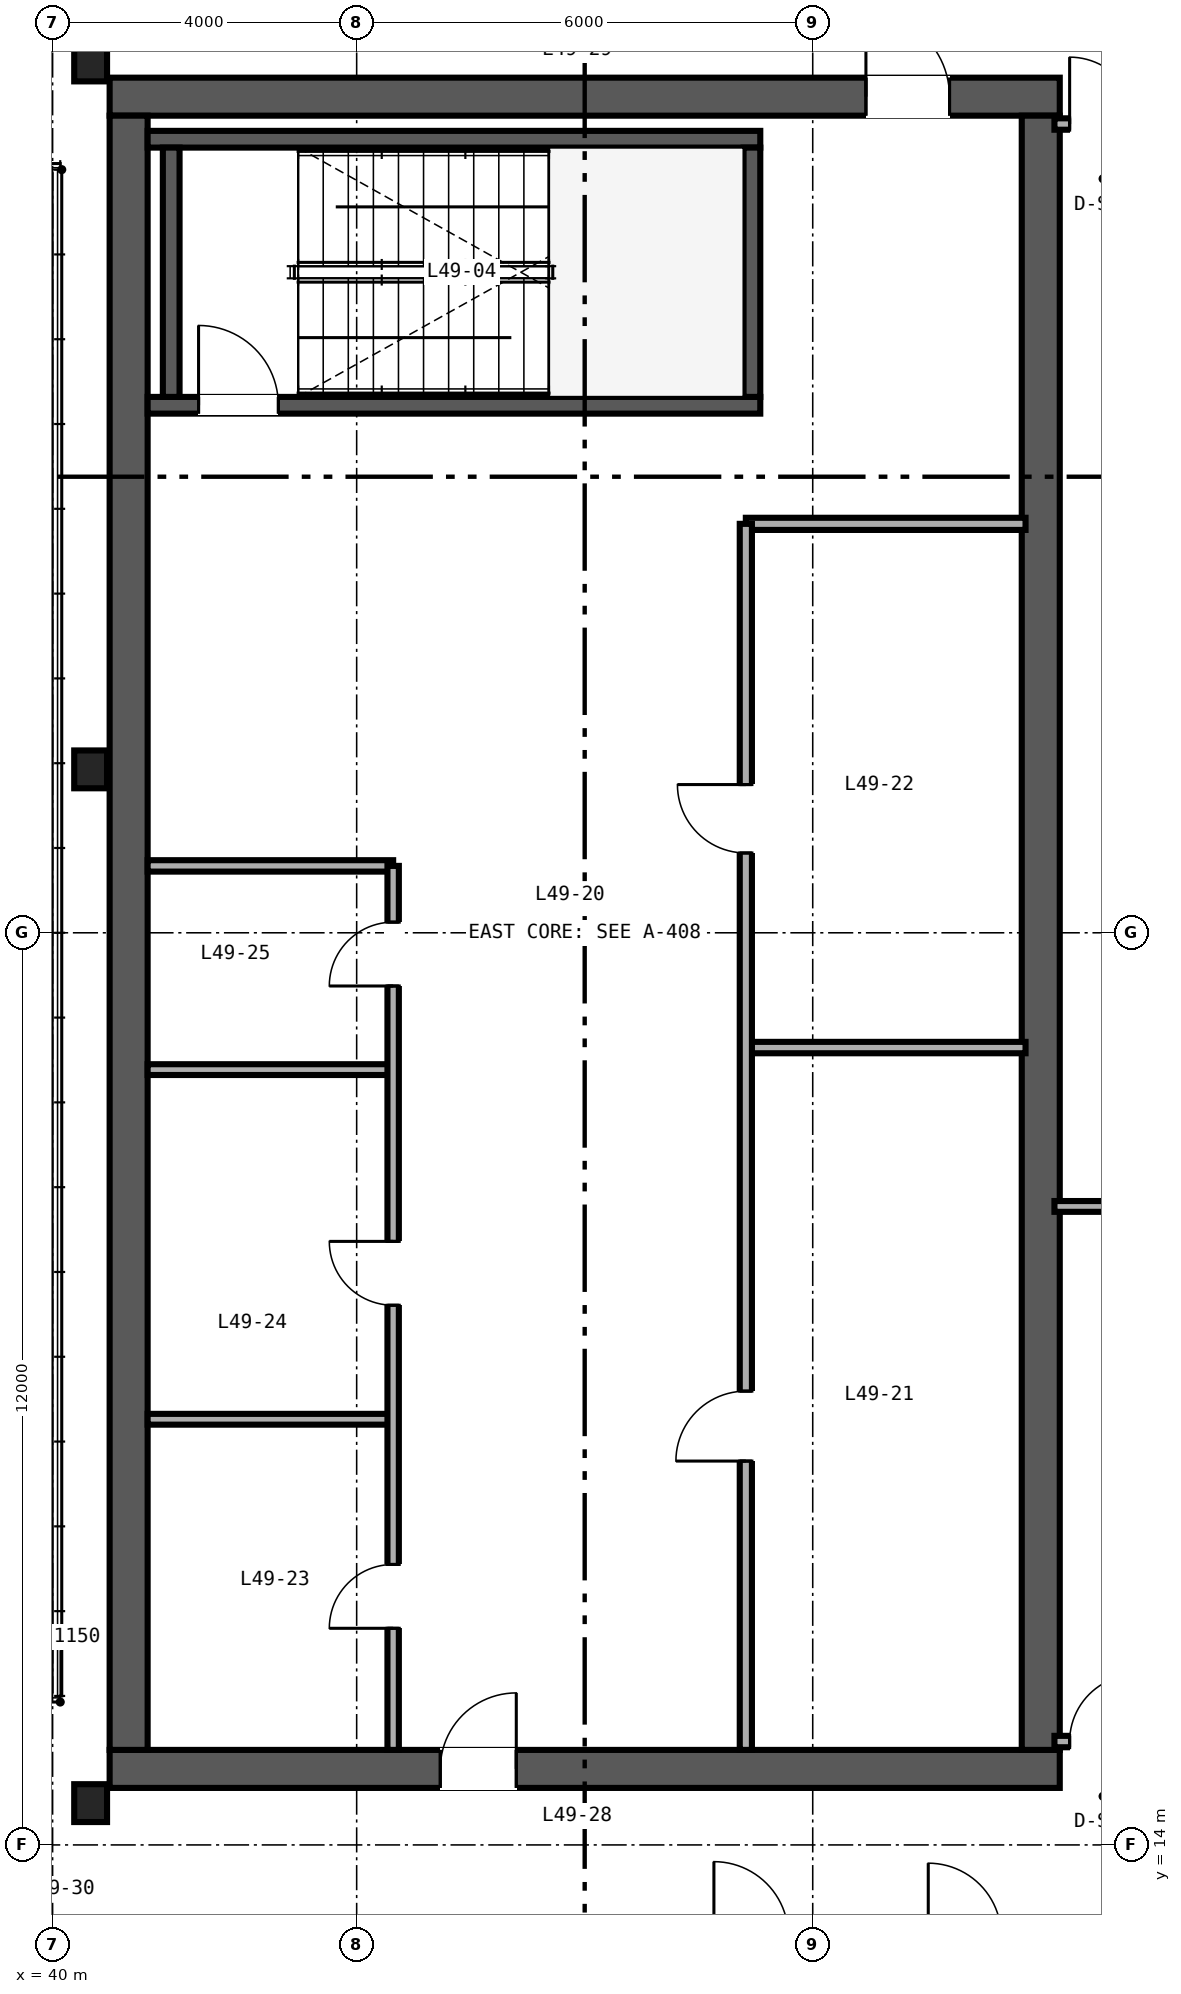
"""IFC4 building model, lengths in metres.
Left out: names, types, materials, properties, quantities, classifications, styles, units other than length and angle.
Written with IfcOpenShell. Run it as: python <this file> out.ifc"""

import sys

from ifc_helpers import new_model, si_unit, direction, frame, frame_2d, origin, origin_2d, place, context, subcontext, project, spatial, rectangle, i_section, extrude, source, transform, mapped, element, fill, save


model = new_model("IFC4")
c1 = context("Model", 3, precision=1e-05, world=origin(), true_north=direction((0.0, 1.0)))
c2 = subcontext(c1, "Body", "Model", "MODEL_VIEW")
j1 = project(units=[si_unit("LENGTHUNIT", "METRE"), si_unit("PLANEANGLEUNIT", "RADIAN")], contexts=[c1])
p1 = place(None, origin())
s1 = spatial("IfcSite", under=j1, at=p1, CompositionType="ELEMENT")
p2 = place(p1, origin())
s2 = spatial("IfcBuilding", under=s1, at=p2, CompositionType="ELEMENT")
p3 = place(p2, frame((0.0, 0.0, 195.6)))
s3 = spatial("IfcBuildingStorey", under=s2, at=p3, CompositionType="ELEMENT", Elevation=195.6)
p4 = place(p3, frame((40.75, 15.0, 0.0), z_axis=(0.0, 0.0, 1.0), x_axis=(1.0, 0.0, 0.0)))
e1 = element("IfcWall", 1, at=p4, inside=s3, PredefinedType="SHEAR", context=c2, shape_type="SweptSolid", body=[
    extrude(rectangle(XDim=12.5, YDim=0.5, at=frame_2d((6.25, 0.0))), origin(), (0.0, 0.0, 1.0), 3.37),
])
p5 = place(p4, frame((4.35, 0.0, 0.0)))
e2 = element("IfcOpeningElement", 2, at=p5, cuts=e1, PredefinedType="OPENING", context=c2, shape_type="SweptSolid", body=[
    extrude(rectangle(XDim=1.0, YDim=2.15, at=frame_2d((0.5, 1.075))), frame((0.0, 0.26, 0.0), z_axis=(0.0, -1.0, 0.0), x_axis=(1.0, 0.0, 0.0)), (0.0, 0.0, 1.0), 0.52),
])
p6 = place(p3, frame((40.75, 37.0, 0.0), z_axis=(0.0, 0.0, 1.0), x_axis=(1.0, 0.0, 0.0)))
e3 = element("IfcWall", 3, at=p6, inside=s3, PredefinedType="SHEAR", context=c2, shape_type="SweptSolid", body=[
    extrude(rectangle(XDim=12.5, YDim=0.5, at=frame_2d((6.25, 0.0))), origin(), (0.0, 0.0, 1.0), 3.37),
])
p7 = place(p6, frame((9.95, 0.0, 0.0)))
e4 = element("IfcOpeningElement", 4, at=p7, cuts=e3, PredefinedType="OPENING", context=c2, shape_type="SweptSolid", body=[
    extrude(rectangle(XDim=1.1, YDim=2.15, at=frame_2d((0.55, 1.075))), frame((0.0, 0.26, 0.0), z_axis=(0.0, -1.0, 0.0), x_axis=(1.0, 0.0, 0.0)), (0.0, 0.0, 1.0), 0.52),
])
for number, where, z_axis, x_axis in (
    (5, (41.0, 15.25, 0.0), (0.0, 0.0, 1.0), (0.0, 1.0, 0.0)),
    (6, (53.0, 15.25, 0.0), (0.0, 0.0, 1.0), (0.0, 1.0, 0.0)),
):
    element("IfcWall", number, at=place(p3, frame(where, z_axis=z_axis, x_axis=x_axis)), inside=s3, PredefinedType="SHEAR", context=c2, shape_type="SweptSolid", body=[
        extrude(rectangle(XDim=21.5, YDim=0.5, at=frame_2d((10.75, 0.0))), origin(), (0.0, 0.0, 1.0), 3.37),
    ])
p8 = place(p3, frame((41.25, 32.94, 0.0), z_axis=(0.0, 0.0, 1.0), x_axis=(1.0, 0.0, 0.0)))
e7 = element("IfcWall", 7, at=p8, inside=s3, PredefinedType="SHEAR", context=c2, shape_type="SweptSolid", body=[
    extrude(rectangle(XDim=8.06, YDim=0.22, at=frame_2d((4.03, 0.0))), origin(), (0.0, 0.0, 1.0), 3.4),
])
p9 = place(p8, frame((0.67, 0.0, 0.0)))
e8 = element("IfcOpeningElement", 8, at=p9, cuts=e7, PredefinedType="OPENING", context=c2, shape_type="SweptSolid", body=[
    extrude(rectangle(XDim=1.05, YDim=2.15, at=frame_2d((0.525, 1.075))), frame((0.0, 0.12, 0.0), z_axis=(0.0, -1.0, 0.0), x_axis=(1.0, 0.0, 0.0)), (0.0, 0.0, 1.0), 0.24),
])
p10 = place(p3, frame((41.25, 36.44, 0.0), z_axis=(0.0, 0.0, 1.0), x_axis=(1.0, 0.0, 0.0)))
e9 = element("IfcWall", 9, at=p10, inside=s3, PredefinedType="SHEAR", context=c2, shape_type="SweptSolid", body=[
    extrude(rectangle(XDim=8.06, YDim=0.22, at=frame_2d((4.03, 0.0))), origin(), (0.0, 0.0, 1.0), 3.4),
])
for number, where, z_axis, x_axis in (
    (10, (41.56, 33.05, 0.0), (0.0, 0.0, 1.0), (0.0, 1.0, 0.0)),
    (11, (49.2, 33.05, 0.0), (0.0, 0.0, 1.0), (0.0, 1.0, 0.0)),
):
    element("IfcWall", number, at=place(p3, frame(where, z_axis=z_axis, x_axis=x_axis)), inside=s3, PredefinedType="SHEAR", context=c2, shape_type="SweptSolid", body=[
        extrude(rectangle(XDim=3.28, YDim=0.22, at=frame_2d((1.64, 0.0))), origin(), (0.0, 0.0, 1.0), 3.4),
    ])
m1 = source(origin(), c2, "Body", "SweptSolid", [
    extrude(i_section(OverallWidth=0.432, OverallDepth=0.498, WebThickness=0.056, FlangeThickness=0.089, FilletRadius=0.025, at=origin_2d()), origin(), (0.0, 0.0, 1.0), 3.37),
])
for number, where, z_axis, x_axis in (
    (12, (40.5, 14.55, 0.0), (0.0, 0.0, 1.0), (1.0, 0.0, 0.0)),
    (13, (40.5, 28.15, 0.0), (0.0, 0.0, 1.0), (1.0, 0.0, 0.0)),
    (14, (40.5, 37.45, 0.0), (0.0, 0.0, 1.0), (1.0, 0.0, 0.0)),
):
    element("IfcColumn", number, at=place(p3, frame(where, z_axis=z_axis, x_axis=x_axis)), inside=s3, PredefinedType="COLUMN", context=c2, shape_type="MappedRepresentation", body=[
        mapped(m1, transform((0.0, 0.0, 0.0), scale=1.0)),
    ])
p11 = place(p3, frame((49.12, 31.38, 0.0), z_axis=(0.0, 0.0, 1.0), x_axis=(1.0, 0.0, 0.0)))
e15 = element("IfcWall", 15, at=p11, inside=s3, PredefinedType="PARTITIONING", context=c2, shape_type="SweptSolid", body=[
    extrude(rectangle(XDim=3.68, YDim=0.16, at=frame_2d((1.84, 0.0))), origin(), (0.0, 0.0, 1.0), 2.47),
])
p12 = place(p3, frame((49.12, 24.49, 0.0), z_axis=(0.0, 0.0, 1.0), x_axis=(1.0, 0.0, 0.0)))
e16 = element("IfcWall", 16, at=p12, inside=s3, PredefinedType="PARTITIONING", context=c2, shape_type="SweptSolid", body=[
    extrude(rectangle(XDim=3.68, YDim=0.15, at=frame_2d((1.84, 0.0))), origin(), (0.0, 0.0, 1.0), 3.37),
])
p13 = place(p3, frame((49.12, 15.25, 0.0), z_axis=(0.0, 0.0, 1.0), x_axis=(0.0, 1.0, 0.0)))
e17 = element("IfcWall", 17, at=p13, inside=s3, PredefinedType="PARTITIONING", context=c2, shape_type="SweptSolid", body=[
    extrude(rectangle(XDim=16.13, YDim=0.16, at=frame_2d((8.065, 0.0))), origin(), (0.0, 0.0, 1.0), 2.443),
])
p14 = place(p13, frame((3.8, 0.0, 0.0)))
e18 = element("IfcOpeningElement", 18, at=p14, cuts=e17, PredefinedType="OPENING", context=c2, shape_type="SweptSolid", body=[
    extrude(rectangle(XDim=0.92, YDim=2.15, at=frame_2d((0.46, 1.075))), frame((0.0, 0.09, 0.0), z_axis=(0.0, -1.0, 0.0), x_axis=(1.0, 0.0, 0.0)), (0.0, 0.0, 1.0), 0.18),
])
p15 = place(p13, frame((11.8, 0.0, 0.0)))
e19 = element("IfcOpeningElement", 19, at=p15, cuts=e17, PredefinedType="OPENING", context=c2, shape_type="SweptSolid", body=[
    extrude(rectangle(XDim=0.9, YDim=2.15, at=frame_2d((0.45, 1.075))), frame((0.0, 0.09, 0.0), z_axis=(0.0, -1.0, 0.0), x_axis=(1.0, 0.0, 0.0)), (0.0, 0.0, 1.0), 0.18),
])
p16 = place(p3, frame((41.25, 26.88, 0.0), z_axis=(0.0, 0.0, 1.0), x_axis=(1.0, 0.0, 0.0)))
e20 = element("IfcWall", 20, at=p16, inside=s3, PredefinedType="PARTITIONING", context=c2, shape_type="SweptSolid", body=[
    extrude(rectangle(XDim=3.23, YDim=0.15, at=frame_2d((1.615, 0.0))), origin(), (0.0, 0.0, 1.0), 3.37),
])
for number, where, z_axis, x_axis in (
    (21, (41.25, 19.6, 0.0), (0.0, 0.0, 1.0), (1.0, 0.0, 0.0)),
    (22, (41.25, 24.2, 0.0), (0.0, 0.0, 1.0), (1.0, 0.0, 0.0)),
):
    element("IfcWall", number, at=place(p3, frame(where, z_axis=z_axis, x_axis=x_axis)), inside=s3, PredefinedType="PARTITIONING", context=c2, shape_type="SweptSolid", body=[
        extrude(rectangle(XDim=3.23, YDim=0.142, at=frame_2d((1.615, 0.0))), origin(), (0.0, 0.0, 1.0), 3.37),
    ])
p17 = place(p3, frame((44.48, 15.25, 0.0), z_axis=(0.0, 0.0, 1.0), x_axis=(0.0, 1.0, 0.0)))
e23 = element("IfcWall", 23, at=p17, inside=s3, PredefinedType="PARTITIONING", context=c2, shape_type="SweptSolid", body=[
    extrude(rectangle(XDim=11.63, YDim=0.15, at=frame_2d((5.815, 0.0))), origin(), (0.0, 0.0, 1.0), 3.37),
])
p18 = place(p17, frame((1.6, 0.0, 0.0)))
e24 = element("IfcOpeningElement", 24, at=p18, cuts=e23, PredefinedType="OPENING", context=c2, shape_type="SweptSolid", body=[
    extrude(rectangle(XDim=0.84, YDim=2.1, at=frame_2d((0.42, 1.05))), frame((0.0, 0.085, 0.0), z_axis=(0.0, -1.0, 0.0), x_axis=(1.0, 0.0, 0.0)), (0.0, 0.0, 1.0), 0.17),
])
p19 = place(p17, frame((5.85, 0.0, 0.0)))
e25 = element("IfcOpeningElement", 25, at=p19, cuts=e23, PredefinedType="OPENING", context=c2, shape_type="SweptSolid", body=[
    extrude(rectangle(XDim=0.84, YDim=2.1, at=frame_2d((0.42, 1.05))), frame((0.0, 0.085, 0.0), z_axis=(0.0, -1.0, 0.0), x_axis=(1.0, 0.0, 0.0)), (0.0, 0.0, 1.0), 0.17),
])
p20 = place(p17, frame((10.05, 0.0, 0.0)))
e26 = element("IfcOpeningElement", 26, at=p20, cuts=e23, PredefinedType="OPENING", context=c2, shape_type="SweptSolid", body=[
    extrude(rectangle(XDim=0.84, YDim=2.1, at=frame_2d((0.42, 1.05))), frame((0.0, 0.085, 0.0), z_axis=(0.0, -1.0, 0.0), x_axis=(1.0, 0.0, 0.0)), (0.0, 0.0, 1.0), 0.17),
])
p21 = place(p3, frame((53.18, 15.36, 0.0), z_axis=(0.0, 0.0, 1.0), x_axis=(1.0, 0.0, 0.0)))
e27 = element("IfcWall", 27, at=p21, inside=s3, PredefinedType="PARTITIONING", context=c2, shape_type="SweptSolid", body=[
    extrude(rectangle(XDim=2.66, YDim=0.15, at=frame_2d((1.33, 0.0))), origin(), (0.0, 0.0, 1.0), 2.591),
])
p22 = place(p21, frame((0.2, 0.0, 0.0)))
e28 = element("IfcOpeningElement", 28, at=p22, cuts=e27, PredefinedType="OPENING", context=c2, shape_type="SweptSolid", body=[
    extrude(rectangle(XDim=0.88, YDim=2.15, at=frame_2d((0.44, 1.075))), frame((0.0, 0.085, 0.0), z_axis=(0.0, -1.0, 0.0), x_axis=(1.0, 0.0, 0.0)), (0.0, 0.0, 1.0), 0.17),
])
p23 = place(p3, frame((53.18, 36.64, 0.0), z_axis=(0.0, 0.0, 1.0), x_axis=(1.0, 0.0, 0.0)))
e29 = element("IfcWall", 29, at=p23, inside=s3, PredefinedType="PARTITIONING", context=c2, shape_type="SweptSolid", body=[
    extrude(rectangle(XDim=2.66, YDim=0.15, at=frame_2d((1.33, 0.0))), origin(), (0.0, 0.0, 1.0), 2.753),
])
p24 = place(p23, frame((0.2, 0.0, 0.0)))
e30 = element("IfcOpeningElement", 30, at=p24, cuts=e29, PredefinedType="OPENING", context=c2, shape_type="SweptSolid", body=[
    extrude(rectangle(XDim=0.88, YDim=2.15, at=frame_2d((0.44, 1.075))), frame((0.0, 0.085, 0.0), z_axis=(0.0, -1.0, 0.0), x_axis=(1.0, 0.0, 0.0)), (0.0, 0.0, 1.0), 0.17),
])
p25 = place(p3, frame((53.18, 22.4, 0.0), z_axis=(0.0, 0.0, 1.0), x_axis=(1.0, 0.0, 0.0)))
e31 = element("IfcWall", 31, at=p25, inside=s3, PredefinedType="PARTITIONING", context=c2, shape_type="SweptSolid", body=[
    extrude(rectangle(XDim=2.66, YDim=0.142, at=frame_2d((1.33, 0.0))), origin(), (0.0, 0.0, 1.0), 2.591),
])
m2 = source(origin(), c2, "Body", "SweptSolid", [
    extrude(rectangle(XDim=1.05, YDim=2.15, at=frame_2d((0.525, 1.075))), frame((0.0, 0.025, 0.0), z_axis=(0.0, -1.0, 0.0), x_axis=(1.0, 0.0, 0.0)), (0.0, 0.0, 1.0), 0.05),
])
p26 = place(p9, origin())
e32 = element("IfcDoor", 32, at=p26, inside=s3, OperationType="SINGLE_SWING_LEFT", PredefinedType="DOOR", context=c2, shape_type="MappedRepresentation", body=[
    mapped(m2, transform((0.0, 0.0, 0.0), scale=1.0)),
])
fill(e8, e32)
m3 = source(origin(), c2, "Body", "SweptSolid", [
    extrude(rectangle(XDim=1.0, YDim=2.15, at=frame_2d((0.5, 1.075))), frame((0.0, 0.025, 0.0), z_axis=(0.0, -1.0, 0.0), x_axis=(1.0, 0.0, 0.0)), (0.0, 0.0, 1.0), 0.05),
])
p27 = place(p5, origin())
e33 = element("IfcDoor", 33, at=p27, inside=s3, OperationType="SINGLE_SWING_RIGHT", PredefinedType="DOOR", context=c2, shape_type="MappedRepresentation", body=[
    mapped(m3, transform((0.0, 0.0, 0.0), scale=1.0)),
])
fill(e2, e33)
m4 = source(origin(), c2, "Body", "SweptSolid", [
    extrude(rectangle(XDim=1.1, YDim=2.15, at=frame_2d((0.55, 1.075))), frame((0.0, 0.025, 0.0), z_axis=(0.0, -1.0, 0.0), x_axis=(1.0, 0.0, 0.0)), (0.0, 0.0, 1.0), 0.05),
])
p28 = place(p7, origin())
e34 = element("IfcDoor", 34, at=p28, inside=s3, OperationType="SINGLE_SWING_LEFT", PredefinedType="DOOR", context=c2, shape_type="MappedRepresentation", body=[
    mapped(m4, transform((0.0, 0.0, 0.0), scale=1.0)),
])
fill(e4, e34)
m5 = source(origin(), c2, "Body", "SweptSolid", [
    extrude(rectangle(XDim=0.92, YDim=2.15, at=frame_2d((0.46, 1.075))), frame((0.0, 0.025, 0.0), z_axis=(0.0, -1.0, 0.0), x_axis=(1.0, 0.0, 0.0)), (0.0, 0.0, 1.0), 0.05),
])
p29 = place(p14, origin())
e35 = element("IfcDoor", 35, at=p29, inside=s3, OperationType="SINGLE_SWING_LEFT", PredefinedType="DOOR", context=c2, shape_type="MappedRepresentation", body=[
    mapped(m5, transform((0.0, 0.0, 0.0), scale=1.0)),
])
fill(e18, e35)
m6 = source(origin(), c2, "Body", "SweptSolid", [
    extrude(rectangle(XDim=0.9, YDim=2.15, at=frame_2d((0.45, 1.075))), frame((0.0, 0.025, 0.0), z_axis=(0.0, -1.0, 0.0), x_axis=(1.0, 0.0, 0.0)), (0.0, 0.0, 1.0), 0.05),
])
p30 = place(p15, origin())
e36 = element("IfcDoor", 36, at=p30, inside=s3, OperationType="SINGLE_SWING_RIGHT", PredefinedType="DOOR", context=c2, shape_type="MappedRepresentation", body=[
    mapped(m6, transform((0.0, 0.0, 0.0), scale=1.0)),
])
fill(e19, e36)
m7 = source(origin(), c2, "Body", "SweptSolid", [
    extrude(rectangle(XDim=0.84, YDim=2.1, at=frame_2d((0.42, 1.05))), frame((0.0, 0.025, 0.0), z_axis=(0.0, -1.0, 0.0), x_axis=(1.0, 0.0, 0.0)), (0.0, 0.0, 1.0), 0.05),
])
p31 = place(p18, origin())
e37 = element("IfcDoor", 37, at=p31, inside=s3, OperationType="SINGLE_SWING_LEFT", PredefinedType="DOOR", context=c2, shape_type="MappedRepresentation", body=[
    mapped(m7, transform((0.0, 0.0, 0.0), scale=1.0)),
])
fill(e24, e37)
p32 = place(p19, origin())
e38 = element("IfcDoor", 38, at=p32, inside=s3, OperationType="SINGLE_SWING_RIGHT", PredefinedType="DOOR", context=c2, shape_type="MappedRepresentation", body=[
    mapped(m7, transform((0.0, 0.0, 0.0), scale=1.0)),
])
fill(e25, e38)
p33 = place(p20, origin())
e39 = element("IfcDoor", 39, at=p33, inside=s3, OperationType="SINGLE_SWING_LEFT", PredefinedType="DOOR", context=c2, shape_type="MappedRepresentation", body=[
    mapped(m7, transform((0.0, 0.0, 0.0), scale=1.0)),
])
fill(e26, e39)
m8 = source(origin(), c2, "Body", "SweptSolid", [
    extrude(rectangle(XDim=0.88, YDim=2.15, at=frame_2d((0.44, 1.075))), frame((0.0, 0.025, 0.0), z_axis=(0.0, -1.0, 0.0), x_axis=(1.0, 0.0, 0.0)), (0.0, 0.0, 1.0), 0.05),
])
p34 = place(p22, origin())
e40 = element("IfcDoor", 40, at=p34, inside=s3, OperationType="SINGLE_SWING_RIGHT", PredefinedType="DOOR", context=c2, shape_type="MappedRepresentation", body=[
    mapped(m8, transform((0.0, 0.0, 0.0), scale=1.0)),
])
fill(e28, e40)
p35 = place(p24, origin())
e41 = element("IfcDoor", 41, at=p35, inside=s3, OperationType="SINGLE_SWING_LEFT", PredefinedType="DOOR", context=c2, shape_type="MappedRepresentation", body=[
    mapped(m8, transform((0.0, 0.0, 0.0), scale=1.0)),
])
fill(e30, e41)
save(model, sys.argv[1])
